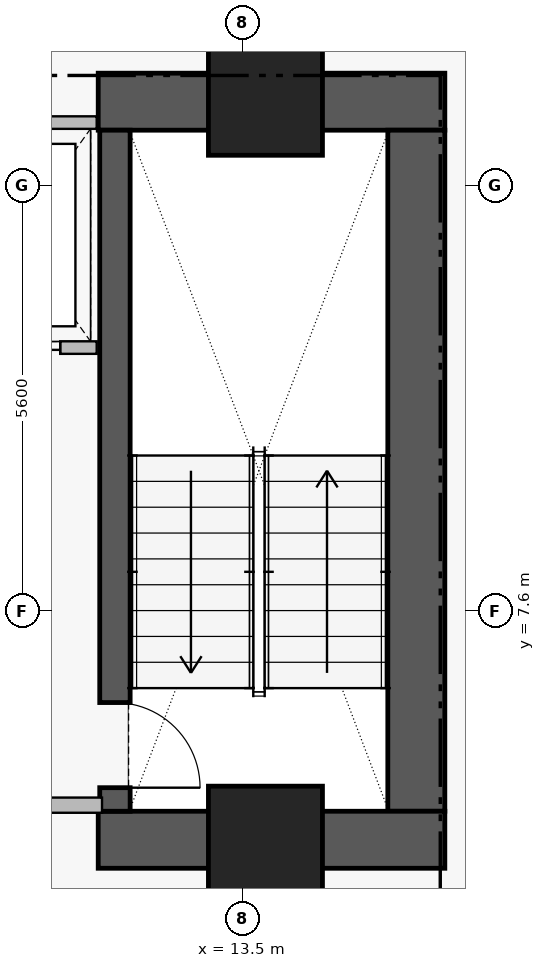
"""IFC4 building model, lengths in metres.
Left out: names, types, materials, properties, quantities, classifications, styles, units other than length and angle.
Written with IfcOpenShell. Run it as: python <this file> out.ifc"""

import sys

from ifc_helpers import new_model, si_unit, direction, frame, frame_2d, origin, origin_2d, place, context, subcontext, project, spatial, rectangle, extrude, element, fill, save


model = new_model("IFC4")
c1 = context("Model", 3, precision=1e-05, world=origin(), true_north=direction((0.0, 1.0)))
c2 = subcontext(c1, "Body", "Model", "MODEL_VIEW")
j1 = project(units=[si_unit("LENGTHUNIT", "METRE"), si_unit("PLANEANGLEUNIT", "RADIAN")], contexts=[c1])
p1 = place(None, origin())
s1 = spatial("IfcSite", under=j1, at=p1, CompositionType="ELEMENT")
p2 = place(p1, origin())
s2 = spatial("IfcBuilding", under=s1, at=p2, CompositionType="ELEMENT")
p3 = place(p2, frame((0.0, 0.0, 139.45)))
s3 = spatial("IfcBuildingStorey", under=s2, at=p3, CompositionType="ELEMENT", Elevation=139.45)
p4 = place(p3, frame((11.6, 14.305, 0.0), z_axis=(0.0, 0.0, 1.0), x_axis=(1.0, 0.0, 0.0)))
e1 = element("IfcWall", 1, at=p4, inside=s3, PredefinedType="SHEAR", context=c2, shape_type="SweptSolid", body=[
    extrude(rectangle(XDim=4.56, YDim=0.75, at=frame_2d((2.28, 0.0))), origin(), (0.0, 0.0, 1.0), 3.46),
])
p5 = place(p3, frame((15.785, 4.97, 0.0), z_axis=(0.0, 0.0, 1.0), x_axis=(0.0, 1.0, 0.0)))
e2 = element("IfcWall", 2, at=p5, inside=s3, PredefinedType="SHEAR", context=c2, shape_type="SweptSolid", body=[
    extrude(rectangle(XDim=8.96, YDim=0.75, at=frame_2d((4.48, 0.0))), origin(), (0.0, 0.0, 1.0), 3.46),
])
p6 = place(p3, frame((11.6, 4.595, 0.0), z_axis=(0.0, 0.0, 1.0), x_axis=(1.0, 0.0, 0.0)))
e3 = element("IfcWall", 3, at=p6, inside=s3, PredefinedType="SHEAR", context=c2, shape_type="SweptSolid", body=[
    extrude(rectangle(XDim=4.56, YDim=0.75, at=frame_2d((2.28, 0.0))), origin(), (0.0, 0.0, 1.0), 3.46),
])
p7 = place(p3, frame((11.82, 13.93, 0.0), z_axis=(0.0, 0.0, 1.0), x_axis=(0.0, -1.0, 0.0)))
e4 = element("IfcWall", 4, at=p7, inside=s3, PredefinedType="SHEAR", context=c2, shape_type="SweptSolid", body=[
    extrude(rectangle(XDim=8.96, YDim=0.4, at=frame_2d((4.48, 0.0))), origin(), (0.0, 0.0, 1.0), 3.46),
])
p8 = place(p7, frame((7.53, 0.0, 0.0)))
e5 = element("IfcOpeningElement", 5, at=p8, cuts=e4, PredefinedType="OPENING", context=c2, shape_type="SweptSolid", body=[
    extrude(rectangle(XDim=1.12, YDim=2.22, at=frame_2d((0.56, 1.11))), frame((0.0, 0.21, 0.0), z_axis=(0.0, -1.0, 0.0), x_axis=(1.0, 0.0, 0.0)), (0.0, 0.0, 1.0), 0.42),
])
for number, where, z_axis, x_axis in (
    (6, (13.8, 14.35, 0.0), (0.0, 0.0, 1.0), (1.0, 0.0, 0.0)),
    (7, (13.8, 4.55, 0.0), (0.0, 0.0, 1.0), (1.0, 0.0, 0.0)),
):
    element("IfcColumn", number, at=place(p3, frame(where, z_axis=z_axis, x_axis=x_axis)), inside=s3, PredefinedType="COLUMN", context=c2, shape_type="SweptSolid", body=[
        extrude(rectangle(XDim=1.5, YDim=1.5, at=origin_2d()), origin(), (0.0, 0.0, 1.0), 3.65),
    ])
p9 = place(p3, frame((9.42, 11.07, 0.0), z_axis=(0.0, 0.0, 1.0), x_axis=(1.0, 0.0, 0.0)))
e8 = element("IfcWall", 8, at=p9, inside=s3, PredefinedType="PARTITIONING", context=c2, shape_type="SweptSolid", body=[
    extrude(rectangle(XDim=2.16, YDim=0.165, at=frame_2d((1.08, 0.0))), origin(), (0.0, 0.0, 1.0), 3.43),
])
p10 = place(p9, frame((0.53, 0.0, 0.0)))
e9 = element("IfcOpeningElement", 9, at=p10, cuts=e8, PredefinedType="OPENING", context=c2, shape_type="SweptSolid", body=[
    extrude(rectangle(XDim=1.15, YDim=2.25, at=frame_2d((0.575, 1.125))), frame((0.0, 0.093, 0.0), z_axis=(0.0, -1.0, 0.0), x_axis=(1.0, 0.0, 0.0)), (0.0, 0.0, 1.0), 0.185),
])
p11 = place(p3, frame((8.8, 5.05, 0.0), z_axis=(0.0, 0.0, 1.0), x_axis=(1.0, 0.0, 0.0)))
e10 = element("IfcWall", 10, at=p11, inside=s3, PredefinedType="PARTITIONING", context=c2, shape_type="SweptSolid", body=[
    extrude(rectangle(XDim=2.85, YDim=0.2, at=frame_2d((1.425, 0.0))), origin(), (0.0, 0.0, 1.0), 3.43),
])
p12 = place(p3, frame((9.42, 14.03, 0.0), z_axis=(0.0, 0.0, 1.0), x_axis=(1.0, 0.0, 0.0)))
e11 = element("IfcWall", 11, at=p12, inside=s3, PredefinedType="PARTITIONING", context=c2, shape_type="SweptSolid", body=[
    extrude(rectangle(XDim=2.16, YDim=0.165, at=frame_2d((1.08, 0.0))), origin(), (0.0, 0.0, 1.0), 3.43),
])
p13 = place(p8, origin())
e12 = element("IfcDoor", 12, at=p13, inside=s3, OperationType="SINGLE_SWING_RIGHT", PredefinedType="DOOR", context=c2, shape_type="SweptSolid", body=[
    extrude(rectangle(XDim=1.12, YDim=2.22, at=frame_2d((0.56, 1.11))), frame((0.0, 0.025, 0.0), z_axis=(0.0, -1.0, 0.0), x_axis=(1.0, 0.0, 0.0)), (0.0, 0.0, 1.0), 0.05),
])
fill(e5, e12)
p14 = place(p10, origin())
e13 = element("IfcDoor", 13, at=p14, inside=s3, OperationType="SLIDING_TO_LEFT", PredefinedType="DOOR", context=c2, shape_type="SweptSolid", body=[
    extrude(rectangle(XDim=1.15, YDim=2.25, at=frame_2d((0.575, 1.125))), frame((0.0, 0.025, 0.0), z_axis=(0.0, -1.0, 0.0), x_axis=(1.0, 0.0, 0.0)), (0.0, 0.0, 1.0), 0.05),
])
fill(e9, e13)
save(model, sys.argv[1])
